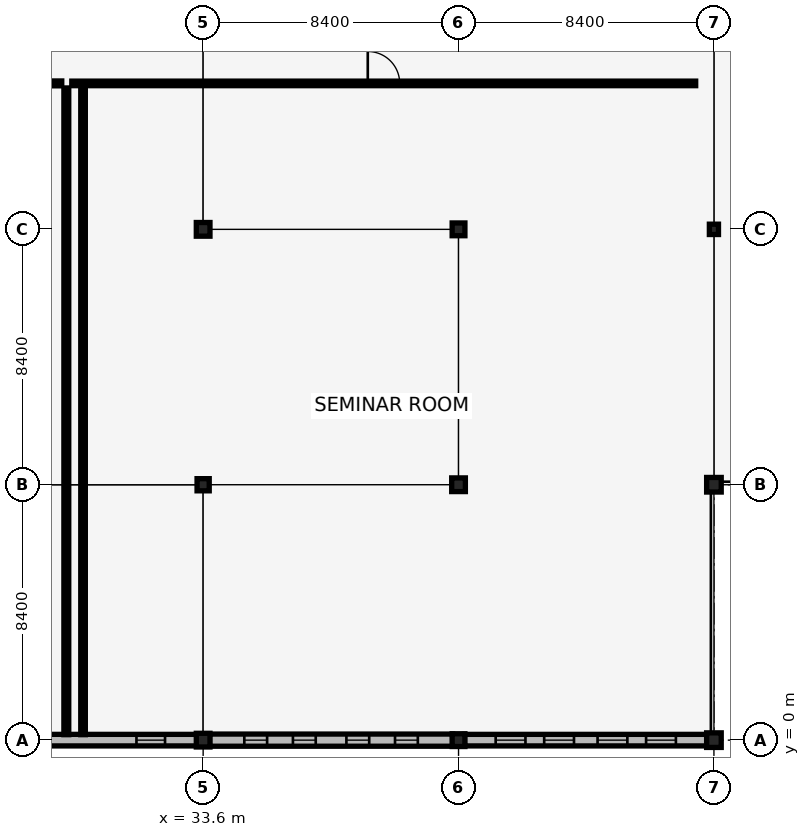
"""IFC4 building model, lengths in metres.
Left out: names, types, materials, properties, quantities, classifications, styles, units other than length and angle.
Written with IfcOpenShell. Run it as: python <this file> out.ifc"""

import sys

from ifc_helpers import new_model, si_unit, direction, frame, frame_2d, origin, origin_2d, place, context, subcontext, project, spatial, rectangle, i_section, extrude, element, fill, save


model = new_model("IFC4")
c1 = context("Model", 3, precision=1e-05, world=origin(), true_north=direction((0.0, 1.0)))
c2 = subcontext(c1, "Body", "Model", "MODEL_VIEW")
j1 = project(units=[si_unit("LENGTHUNIT", "METRE"), si_unit("PLANEANGLEUNIT", "RADIAN")], contexts=[c1])
p1 = place(None, origin())
s1 = spatial("IfcSite", under=j1, at=p1, CompositionType="ELEMENT")
p2 = place(p1, origin())
s2 = spatial("IfcBuilding", under=s1, at=p2, CompositionType="ELEMENT")
p3 = place(p2, frame((0.0, 0.0, 5.44)))
s3 = spatial("IfcBuildingStorey", under=s2, at=p3, CompositionType="ELEMENT", Elevation=5.44)
p4 = place(p3, frame((33.6, 0.0, 0.0), z_axis=(0.0, 0.0, 1.0), x_axis=(1.0, 0.0, 0.0)))
e1 = element("IfcColumn", 1, at=p4, inside=s3, PredefinedType="COLUMN", context=c2, shape_type="SweptSolid", body=[
    extrude(rectangle(XDim=0.45, YDim=0.45, at=origin_2d()), origin(), (0.0, 0.0, 1.0), 4.12),
])
p5 = place(p3, frame((33.6, 8.4, 0.0), z_axis=(0.0, 0.0, 1.0), x_axis=(1.0, 0.0, 0.0)))
e2 = element("IfcColumn", 2, at=p5, inside=s3, PredefinedType="COLUMN", context=c2, shape_type="SweptSolid", body=[
    extrude(rectangle(XDim=0.4, YDim=0.4, at=origin_2d()), origin(), (0.0, 0.0, 1.0), 4.12),
])
p6 = place(p3, frame((33.6, 16.8, 0.0), z_axis=(0.0, 0.0, 1.0), x_axis=(1.0, 0.0, 0.0)))
e3 = element("IfcColumn", 3, at=p6, inside=s3, PredefinedType="COLUMN", context=c2, shape_type="SweptSolid", body=[
    extrude(rectangle(XDim=0.45, YDim=0.45, at=origin_2d()), origin(), (0.0, 0.0, 1.0), 4.12),
])
p7 = place(p3, frame((42.0, 0.0, 0.0), z_axis=(0.0, 0.0, 1.0), x_axis=(1.0, 0.0, 0.0)))
e4 = element("IfcColumn", 4, at=p7, inside=s3, PredefinedType="COLUMN", context=c2, shape_type="SweptSolid", body=[
    extrude(rectangle(XDim=0.42, YDim=0.42, at=origin_2d()), origin(), (0.0, 0.0, 1.0), 4.12),
])
p8 = place(p3, frame((42.0, 8.4, 0.0), z_axis=(0.0, 0.0, 1.0), x_axis=(1.0, 0.0, 0.0)))
e5 = element("IfcColumn", 5, at=p8, inside=s3, PredefinedType="COLUMN", context=c2, shape_type="SweptSolid", body=[
    extrude(rectangle(XDim=0.45, YDim=0.45, at=origin_2d()), origin(), (0.0, 0.0, 1.0), 4.12),
])
p9 = place(p3, frame((42.0, 16.8, 0.0), z_axis=(0.0, 0.0, 1.0), x_axis=(1.0, 0.0, 0.0)))
e6 = element("IfcColumn", 6, at=p9, inside=s3, PredefinedType="COLUMN", context=c2, shape_type="SweptSolid", body=[
    extrude(rectangle(XDim=0.42, YDim=0.42, at=origin_2d()), origin(), (0.0, 0.0, 1.0), 4.12),
])
for number, where, z_axis, x_axis in (
    (7, (50.4, 0.0, 0.0), (0.0, 0.0, 1.0), (1.0, 0.0, 0.0)),
    (8, (50.4, 8.4, 0.0), (0.0, 0.0, 1.0), (1.0, 0.0, 0.0)),
):
    element("IfcColumn", number, at=place(p3, frame(where, z_axis=z_axis, x_axis=x_axis)), inside=s3, PredefinedType="COLUMN", context=c2, shape_type="SweptSolid", body=[
        extrude(rectangle(XDim=0.48, YDim=0.48, at=origin_2d()), origin(), (0.0, 0.0, 1.0), 4.12),
    ])
p10 = place(p3, frame((50.4, 16.8, 0.0), z_axis=(0.0, 0.0, 1.0), x_axis=(1.0, 0.0, 0.0)))
e9 = element("IfcColumn", 9, at=p10, inside=s3, PredefinedType="COLUMN", context=c2, shape_type="SweptSolid", body=[
    extrude(i_section(OverallWidth=0.3, OverallDepth=0.34, WebThickness=0.012, FlangeThickness=0.021, FilletRadius=0.027, at=origin_2d()), origin(), (0.0, 0.0, 1.0), 4.12),
])
p11 = place(p3, frame((25.425, 0.0, 0.0), z_axis=(0.0, 0.0, 1.0), x_axis=(1.0, 0.0, 0.0)))
e10 = element("IfcWall", 10, at=p11, inside=s3, PredefinedType="SOLIDWALL", context=c2, shape_type="SweptSolid", body=[
    extrude(rectangle(XDim=7.965, YDim=0.38, at=frame_2d((3.982, 0.0))), origin(), (0.0, 0.0, 1.0), 4.12),
])
p12 = place(p11, frame((1.043, 0.0, 0.75)))
e11 = element("IfcOpeningElement", 11, at=p12, cuts=e10, PredefinedType="OPENING", context=c2, shape_type="SweptSolid", body=[
    extrude(rectangle(XDim=0.94, YDim=2.55, at=frame_2d((0.47, 1.275))), frame((0.0, 0.2, 0.0), z_axis=(0.0, -1.0, 0.0), x_axis=(1.0, 0.0, 0.0)), (0.0, 0.0, 1.0), 0.4),
])
p13 = place(p11, frame((5.982, 0.0, 0.75)))
e12 = element("IfcOpeningElement", 12, at=p13, cuts=e10, PredefinedType="OPENING", context=c2, shape_type="SweptSolid", body=[
    extrude(rectangle(XDim=0.94, YDim=2.55, at=frame_2d((0.47, 1.275))), frame((0.0, 0.2, 0.0), z_axis=(0.0, -1.0, 0.0), x_axis=(1.0, 0.0, 0.0)), (0.0, 0.0, 1.0), 0.4),
])
p14 = place(p3, frame((33.81, 0.0, 0.0), z_axis=(0.0, 0.0, 1.0), x_axis=(1.0, 0.0, 0.0)))
e13 = element("IfcWall", 13, at=p14, inside=s3, PredefinedType="SOLIDWALL", context=c2, shape_type="SweptSolid", body=[
    extrude(rectangle(XDim=7.995, YDim=0.4, at=frame_2d((3.998, 0.0))), origin(), (0.0, 0.0, 1.0), 4.12),
])
p15 = place(p14, frame((1.144, 0.0, 0.75)))
e14 = element("IfcOpeningElement", 14, at=p15, cuts=e13, PredefinedType="OPENING", context=c2, shape_type="SweptSolid", body=[
    extrude(rectangle(XDim=0.75, YDim=2.1, at=frame_2d((0.375, 1.05))), frame((0.0, 0.21, 0.0), z_axis=(0.0, -1.0, 0.0), x_axis=(1.0, 0.0, 0.0)), (0.0, 0.0, 1.0), 0.42),
])
p16 = place(p14, frame((2.743, 0.0, 0.75)))
e15 = element("IfcOpeningElement", 15, at=p16, cuts=e13, PredefinedType="OPENING", context=c2, shape_type="SweptSolid", body=[
    extrude(rectangle(XDim=0.75, YDim=2.1, at=frame_2d((0.375, 1.05))), frame((0.0, 0.21, 0.0), z_axis=(0.0, -1.0, 0.0), x_axis=(1.0, 0.0, 0.0)), (0.0, 0.0, 1.0), 0.42),
])
p17 = place(p14, frame((4.502, 0.0, 0.75)))
e16 = element("IfcOpeningElement", 16, at=p17, cuts=e13, PredefinedType="OPENING", context=c2, shape_type="SweptSolid", body=[
    extrude(rectangle(XDim=0.75, YDim=2.1, at=frame_2d((0.375, 1.05))), frame((0.0, 0.21, 0.0), z_axis=(0.0, -1.0, 0.0), x_axis=(1.0, 0.0, 0.0)), (0.0, 0.0, 1.0), 0.42),
])
p18 = place(p14, frame((6.101, 0.0, 0.75)))
e17 = element("IfcOpeningElement", 17, at=p18, cuts=e13, PredefinedType="OPENING", context=c2, shape_type="SweptSolid", body=[
    extrude(rectangle(XDim=0.75, YDim=2.1, at=frame_2d((0.375, 1.05))), frame((0.0, 0.21, 0.0), z_axis=(0.0, -1.0, 0.0), x_axis=(1.0, 0.0, 0.0)), (0.0, 0.0, 1.0), 0.42),
])
p19 = place(p3, frame((42.195, 0.0, 0.0), z_axis=(0.0, 0.0, 1.0), x_axis=(1.0, 0.0, 0.0)))
e18 = element("IfcWall", 18, at=p19, inside=s3, PredefinedType="SOLIDWALL", context=c2, shape_type="SweptSolid", body=[
    extrude(rectangle(XDim=7.98, YDim=0.38, at=frame_2d((3.99, 0.0))), origin(), (0.0, 0.0, 1.0), 4.12),
])
p20 = place(p19, frame((1.026, 0.0, 0.75)))
e19 = element("IfcOpeningElement", 19, at=p20, cuts=e18, PredefinedType="OPENING", context=c2, shape_type="SweptSolid", body=[
    extrude(rectangle(XDim=0.98, YDim=2.6, at=frame_2d((0.49, 1.3))), frame((0.0, 0.2, 0.0), z_axis=(0.0, -1.0, 0.0), x_axis=(1.0, 0.0, 0.0)), (0.0, 0.0, 1.0), 0.4),
])
p21 = place(p19, frame((2.622, 0.0, 0.75)))
e20 = element("IfcOpeningElement", 20, at=p21, cuts=e18, PredefinedType="OPENING", context=c2, shape_type="SweptSolid", body=[
    extrude(rectangle(XDim=0.98, YDim=2.6, at=frame_2d((0.49, 1.3))), frame((0.0, 0.2, 0.0), z_axis=(0.0, -1.0, 0.0), x_axis=(1.0, 0.0, 0.0)), (0.0, 0.0, 1.0), 0.4),
])
p22 = place(p19, frame((4.378, 0.0, 0.75)))
e21 = element("IfcOpeningElement", 21, at=p22, cuts=e18, PredefinedType="OPENING", context=c2, shape_type="SweptSolid", body=[
    extrude(rectangle(XDim=0.98, YDim=2.6, at=frame_2d((0.49, 1.3))), frame((0.0, 0.2, 0.0), z_axis=(0.0, -1.0, 0.0), x_axis=(1.0, 0.0, 0.0)), (0.0, 0.0, 1.0), 0.4),
])
p23 = place(p19, frame((5.974, 0.0, 0.75)))
e22 = element("IfcOpeningElement", 22, at=p23, cuts=e18, PredefinedType="OPENING", context=c2, shape_type="SweptSolid", body=[
    extrude(rectangle(XDim=0.98, YDim=2.6, at=frame_2d((0.49, 1.3))), frame((0.0, 0.2, 0.0), z_axis=(0.0, -1.0, 0.0), x_axis=(1.0, 0.0, 0.0)), (0.0, 0.0, 1.0), 0.4),
])
p24 = place(p3, frame((18.8, 21.6, 0.0), z_axis=(0.0, 0.0, 1.0), x_axis=(1.0, 0.0, 0.0)))
e23 = element("IfcWall", 23, at=p24, inside=s3, PredefinedType="PARTITIONING", context=c2, shape_type="SweptSolid", body=[
    extrude(rectangle(XDim=10.15, YDim=0.16, at=frame_2d((5.075, 0.0))), origin(), (0.0, 0.0, 1.0), 4.12),
])
p25 = place(p24, frame((4.425, 0.0, 0.0)))
e24 = element("IfcOpeningElement", 24, at=p25, cuts=e23, PredefinedType="OPENING", context=c2, shape_type="SweptSolid", body=[
    extrude(rectangle(XDim=1.3, YDim=2.2, at=frame_2d((0.65, 1.1))), frame((0.0, 0.09, 0.0), z_axis=(0.0, -1.0, 0.0), x_axis=(1.0, 0.0, 0.0)), (0.0, 0.0, 1.0), 0.18),
])
p26 = place(p3, frame((29.1, 0.18, 0.0), z_axis=(0.0, 0.0, 1.0), x_axis=(0.0, 1.0, 0.0)))
e25 = element("IfcWall", 25, at=p26, inside=s3, PredefinedType="PARTITIONING", context=c2, shape_type="SweptSolid", body=[
    extrude(rectangle(XDim=21.27, YDim=0.16, at=frame_2d((10.635, 0.0))), origin(), (0.0, 0.0, 1.0), 4.12),
])
p27 = place(p3, frame((29.28, 21.6, 0.0), z_axis=(0.0, 0.0, 1.0), x_axis=(1.0, 0.0, 0.0)))
e26 = element("IfcWall", 26, at=p27, inside=s3, PredefinedType="PARTITIONING", context=c2, shape_type="SweptSolid", body=[
    extrude(rectangle(XDim=20.52, YDim=0.15, at=frame_2d((10.26, 0.0))), origin(), (0.0, 0.0, 1.0), 4.12),
])
p28 = place(p27, frame((9.735, 0.0, 0.0)))
e27 = element("IfcOpeningElement", 27, at=p28, cuts=e26, PredefinedType="OPENING", context=c2, shape_type="SweptSolid", body=[
    extrude(rectangle(XDim=1.05, YDim=2.15, at=frame_2d((0.525, 1.075))), frame((0.0, 0.085, 0.0), z_axis=(0.0, -1.0, 0.0), x_axis=(1.0, 0.0, 0.0)), (0.0, 0.0, 1.0), 0.17),
])
p29 = place(p3, frame((29.65, 0.18, 0.0), z_axis=(0.0, 0.0, 1.0), x_axis=(0.0, 1.0, 0.0)))
e28 = element("IfcWall", 28, at=p29, inside=s3, PredefinedType="PARTITIONING", context=c2, shape_type="SweptSolid", body=[
    extrude(rectangle(XDim=21.27, YDim=0.15, at=frame_2d((10.635, 0.0))), origin(), (0.0, 0.0, 1.0), 4.12),
])
p30 = place(p13, origin())
e29 = element("IfcWindow", 29, at=p30, inside=s3, PartitioningType="DOUBLE_PANEL_VERTICAL", PredefinedType="WINDOW", context=c2, shape_type="SweptSolid", body=[
    extrude(rectangle(XDim=0.94, YDim=2.55, at=frame_2d((0.47, 1.275))), frame((0.0, 0.03, 0.0), z_axis=(0.0, -1.0, 0.0), x_axis=(1.0, 0.0, 0.0)), (0.0, 0.0, 1.0), 0.06),
])
fill(e12, e29)
p31 = place(p15, origin())
e30 = element("IfcWindow", 30, at=p31, inside=s3, PartitioningType="DOUBLE_PANEL_VERTICAL", PredefinedType="WINDOW", context=c2, shape_type="SweptSolid", body=[
    extrude(rectangle(XDim=0.75, YDim=2.1, at=frame_2d((0.375, 1.05))), frame((0.0, 0.03, 0.0), z_axis=(0.0, -1.0, 0.0), x_axis=(1.0, 0.0, 0.0)), (0.0, 0.0, 1.0), 0.06),
])
fill(e14, e30)
p32 = place(p16, origin())
e31 = element("IfcWindow", 31, at=p32, inside=s3, PartitioningType="DOUBLE_PANEL_VERTICAL", PredefinedType="WINDOW", context=c2, shape_type="SweptSolid", body=[
    extrude(rectangle(XDim=0.75, YDim=2.1, at=frame_2d((0.375, 1.05))), frame((0.0, 0.03, 0.0), z_axis=(0.0, -1.0, 0.0), x_axis=(1.0, 0.0, 0.0)), (0.0, 0.0, 1.0), 0.06),
])
fill(e15, e31)
p33 = place(p17, origin())
e32 = element("IfcWindow", 32, at=p33, inside=s3, PartitioningType="DOUBLE_PANEL_VERTICAL", PredefinedType="WINDOW", context=c2, shape_type="SweptSolid", body=[
    extrude(rectangle(XDim=0.75, YDim=2.1, at=frame_2d((0.375, 1.05))), frame((0.0, 0.03, 0.0), z_axis=(0.0, -1.0, 0.0), x_axis=(1.0, 0.0, 0.0)), (0.0, 0.0, 1.0), 0.06),
])
fill(e16, e32)
p34 = place(p18, origin())
e33 = element("IfcWindow", 33, at=p34, inside=s3, PartitioningType="DOUBLE_PANEL_VERTICAL", PredefinedType="WINDOW", context=c2, shape_type="SweptSolid", body=[
    extrude(rectangle(XDim=0.75, YDim=2.1, at=frame_2d((0.375, 1.05))), frame((0.0, 0.03, 0.0), z_axis=(0.0, -1.0, 0.0), x_axis=(1.0, 0.0, 0.0)), (0.0, 0.0, 1.0), 0.06),
])
fill(e17, e33)
p35 = place(p20, origin())
e34 = element("IfcWindow", 34, at=p35, inside=s3, PartitioningType="DOUBLE_PANEL_VERTICAL", PredefinedType="WINDOW", context=c2, shape_type="SweptSolid", body=[
    extrude(rectangle(XDim=0.98, YDim=2.6, at=frame_2d((0.49, 1.3))), frame((0.0, 0.03, 0.0), z_axis=(0.0, -1.0, 0.0), x_axis=(1.0, 0.0, 0.0)), (0.0, 0.0, 1.0), 0.06),
])
fill(e19, e34)
p36 = place(p21, origin())
e35 = element("IfcWindow", 35, at=p36, inside=s3, PartitioningType="DOUBLE_PANEL_VERTICAL", PredefinedType="WINDOW", context=c2, shape_type="SweptSolid", body=[
    extrude(rectangle(XDim=0.98, YDim=2.6, at=frame_2d((0.49, 1.3))), frame((0.0, 0.03, 0.0), z_axis=(0.0, -1.0, 0.0), x_axis=(1.0, 0.0, 0.0)), (0.0, 0.0, 1.0), 0.06),
])
fill(e20, e35)
p37 = place(p22, origin())
e36 = element("IfcWindow", 36, at=p37, inside=s3, PartitioningType="DOUBLE_PANEL_VERTICAL", PredefinedType="WINDOW", context=c2, shape_type="SweptSolid", body=[
    extrude(rectangle(XDim=0.98, YDim=2.6, at=frame_2d((0.49, 1.3))), frame((0.0, 0.03, 0.0), z_axis=(0.0, -1.0, 0.0), x_axis=(1.0, 0.0, 0.0)), (0.0, 0.0, 1.0), 0.06),
])
fill(e21, e36)
p38 = place(p23, origin())
e37 = element("IfcWindow", 37, at=p38, inside=s3, PartitioningType="DOUBLE_PANEL_VERTICAL", PredefinedType="WINDOW", context=c2, shape_type="SweptSolid", body=[
    extrude(rectangle(XDim=0.98, YDim=2.6, at=frame_2d((0.49, 1.3))), frame((0.0, 0.03, 0.0), z_axis=(0.0, -1.0, 0.0), x_axis=(1.0, 0.0, 0.0)), (0.0, 0.0, 1.0), 0.06),
])
fill(e22, e37)
p39 = place(p28, origin())
e38 = element("IfcDoor", 38, at=p39, inside=s3, OperationType="SINGLE_SWING_LEFT", PredefinedType="DOOR", context=c2, shape_type="SweptSolid", body=[
    extrude(rectangle(XDim=1.05, YDim=2.15, at=frame_2d((0.525, 1.075))), frame((0.0, 0.025, 0.0), z_axis=(0.0, -1.0, 0.0), x_axis=(1.0, 0.0, 0.0)), (0.0, 0.0, 1.0), 0.05),
])
fill(e27, e38)
save(model, sys.argv[1])
